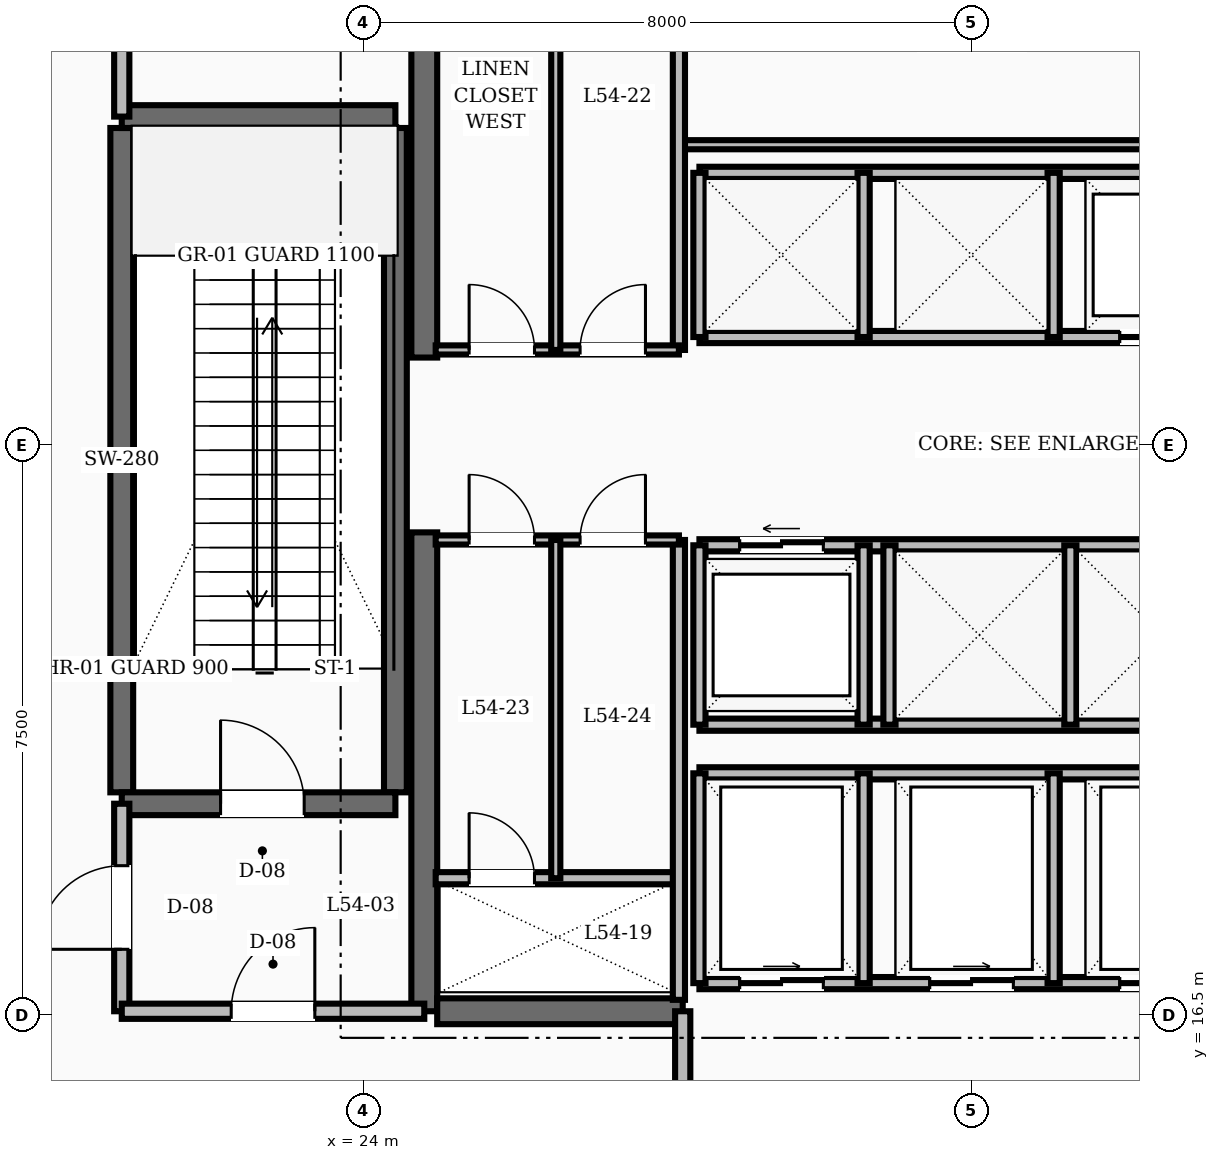
"""IFC4 building model, lengths in metres.
Left out: names, types, materials, properties, quantities, classifications, styles, units other than length and angle.
Written with IfcOpenShell. Run it as: python <this file> out.ifc"""

import sys

from ifc_helpers import new_model, si_unit, direction, frame, frame_2d, origin, place, context, subcontext, project, spatial, rectangle, extrude, element, fill, save


model = new_model("IFC4")
c1 = context("Model", 3, precision=1e-05, world=origin(), true_north=direction((0.0, 1.0)))
c2 = subcontext(c1, "Body", "Model", "MODEL_VIEW")
j1 = project(units=[si_unit("LENGTHUNIT", "METRE"), si_unit("PLANEANGLEUNIT", "RADIAN")], contexts=[c1])
p1 = place(None, origin())
s1 = spatial("IfcSite", under=j1, at=p1, CompositionType="ELEMENT")
p2 = place(p1, origin())
s2 = spatial("IfcBuilding", under=s1, at=p2, CompositionType="ELEMENT")
p3 = place(p2, frame((0.0, 0.0, 208.4)))
s3 = spatial("IfcBuildingStorey", under=s2, at=p3, CompositionType="ELEMENT", Elevation=208.4)
for number, where, z_axis, x_axis in (
    (1, (24.8, 16.55, 0.0), (0.0, 0.0, 1.0), (0.0, 1.0, 0.0)),
    (2, (24.8, 25.15, 0.0), (0.0, 0.0, 1.0), (0.0, 1.0, 0.0)),
):
    element("IfcWall", number, at=place(p3, frame(where, z_axis=z_axis, x_axis=x_axis)), inside=s3, PredefinedType="SHEAR", context=c2, shape_type="SweptSolid", body=[
        extrude(rectangle(XDim=6.3, YDim=0.34, at=frame_2d((3.15, 0.0))), origin(), (0.0, 0.0, 1.0), 6.4),
    ])
p4 = place(p3, frame((24.97, 16.55, 0.0), z_axis=(0.0, 0.0, 1.0), x_axis=(1.0, 0.0, 0.0)))
e3 = element("IfcWall", 3, at=p4, inside=s3, PredefinedType="SHEAR", context=c2, shape_type="SweptSolid", body=[
    extrude(rectangle(XDim=3.23, YDim=0.34, at=frame_2d((1.615, 0.0))), origin(), (0.0, 0.0, 1.0), 6.4),
])
for number, where, z_axis, x_axis in (
    (4, (20.82, 19.43, 0.0), (0.0, 0.0, 1.0), (0.0, 1.0, 0.0)),
    (5, (24.42, 19.43, 0.0), (0.0, 0.0, 1.0), (0.0, 1.0, 0.0)),
):
    element("IfcWall", number, at=place(p3, frame(where, z_axis=z_axis, x_axis=x_axis)), inside=s3, PredefinedType="SHEAR", context=c2, shape_type="SweptSolid", body=[
        extrude(rectangle(XDim=8.74, YDim=0.3, at=frame_2d((4.37, 0.0))), origin(), (0.0, 0.0, 1.0), 6.4),
    ])
p5 = place(p3, frame((20.82, 19.28, 0.0), z_axis=(0.0, 0.0, 1.0), x_axis=(1.0, 0.0, 0.0)))
e6 = element("IfcWall", 6, at=p5, inside=s3, PredefinedType="SHEAR", context=c2, shape_type="SweptSolid", body=[
    extrude(rectangle(XDim=3.6, YDim=0.3, at=frame_2d((1.8, 0.0))), origin(), (0.0, 0.0, 1.0), 6.4),
])
p6 = place(p5, frame((1.3, 0.0, 0.0)))
e7 = element("IfcOpeningElement", 7, at=p6, cuts=e6, PredefinedType="OPENING", context=c2, shape_type="SweptSolid", body=[
    extrude(rectangle(XDim=1.1, YDim=2.1, at=frame_2d((0.55, 1.05))), frame((0.0, 0.16, 0.0), z_axis=(0.0, -1.0, 0.0), x_axis=(1.0, 0.0, 0.0)), (0.0, 0.0, 1.0), 0.32),
])
p7 = place(p3, frame((20.82, 28.32, 0.0), z_axis=(0.0, 0.0, 1.0), x_axis=(1.0, 0.0, 0.0)))
e8 = element("IfcWall", 8, at=p7, inside=s3, PredefinedType="SHEAR", context=c2, shape_type="SweptSolid", body=[
    extrude(rectangle(XDim=3.6, YDim=0.3, at=frame_2d((1.8, 0.0))), origin(), (0.0, 0.0, 1.0), 6.4),
])
p8 = place(p3, frame((20.82, 16.55, 0.0), z_axis=(0.0, 0.0, 1.0), x_axis=(0.0, 1.0, 0.0)))
e9 = element("IfcWall", 9, at=p8, inside=s3, PredefinedType="SOLIDWALL", context=c2, shape_type="SweptSolid", body=[
    extrude(rectangle(XDim=2.73, YDim=0.2, at=frame_2d((1.365, 0.0))), origin(), (0.0, 0.0, 1.0), 5.13),
])
p9 = place(p8, frame((0.815, 0.0, 0.0)))
e10 = element("IfcOpeningElement", 10, at=p9, cuts=e9, PredefinedType="OPENING", context=c2, shape_type="SweptSolid", body=[
    extrude(rectangle(XDim=1.1, YDim=2.1, at=frame_2d((0.55, 1.05))), frame((0.0, 0.11, 0.0), z_axis=(0.0, -1.0, 0.0), x_axis=(1.0, 0.0, 0.0)), (0.0, 0.0, 1.0), 0.22),
])
p10 = place(p3, frame((20.82, 16.55, 0.0), z_axis=(0.0, 0.0, 1.0), x_axis=(1.0, 0.0, 0.0)))
e11 = element("IfcWall", 11, at=p10, inside=s3, PredefinedType="SOLIDWALL", context=c2, shape_type="SweptSolid", body=[
    extrude(rectangle(XDim=3.98, YDim=0.2, at=frame_2d((1.99, 0.0))), origin(), (0.0, 0.0, 1.0), 5.13),
])
p11 = place(p10, frame((1.44, 0.0, 0.0)))
e12 = element("IfcOpeningElement", 12, at=p11, cuts=e11, PredefinedType="OPENING", context=c2, shape_type="SweptSolid", body=[
    extrude(rectangle(XDim=1.1, YDim=2.1, at=frame_2d((0.55, 1.05))), frame((0.0, 0.11, 0.0), z_axis=(0.0, -1.0, 0.0), x_axis=(1.0, 0.0, 0.0)), (0.0, 0.0, 1.0), 0.22),
])
p12 = place(p3, frame((20.82, 28.32, 0.0), z_axis=(0.0, 0.0, 1.0), x_axis=(0.0, 1.0, 0.0)))
e13 = element("IfcWall", 13, at=p12, inside=s3, PredefinedType="SOLIDWALL", context=c2, shape_type="SweptSolid", body=[
    extrude(rectangle(XDim=3.13, YDim=0.2, at=frame_2d((1.565, 0.0))), origin(), (0.0, 0.0, 1.0), 5.13),
])
p13 = place(p12, frame((1.09, 0.0, 0.0)))
e14 = element("IfcOpeningElement", 14, at=p13, cuts=e13, PredefinedType="OPENING", context=c2, shape_type="SweptSolid", body=[
    extrude(rectangle(XDim=0.95, YDim=2.1, at=frame_2d((0.475, 1.05))), frame((0.0, 0.11, 0.0), z_axis=(0.0, -1.0, 0.0), x_axis=(1.0, 0.0, 0.0)), (0.0, 0.0, 1.0), 0.22),
])
p14 = place(p3, frame((28.2, 14.35, 0.0), z_axis=(0.0, 0.0, 1.0), x_axis=(0.0, 1.0, 0.0)))
e15 = element("IfcWall", 15, at=p14, inside=s3, PredefinedType="SOLIDWALL", context=c2, shape_type="SweptSolid", body=[
    extrude(rectangle(XDim=2.2, YDim=0.2, at=frame_2d((1.1, 0.0))), origin(), (0.0, 0.0, 1.0), 5.13),
])
p15 = place(p3, frame((28.42, 25.42, 0.0), z_axis=(0.0, 0.0, 1.0), x_axis=(1.0, 0.0, 0.0)))
e16 = element("IfcWall", 16, at=p15, inside=s3, PredefinedType="SOLIDWALL", context=c2, shape_type="SweptSolid", body=[
    extrude(rectangle(XDim=7.16, YDim=0.16, at=frame_2d((3.58, 0.0))), origin(), (0.0, 0.0, 1.0), 5.13),
])
p16 = place(p15, frame((5.53, 0.0, 0.0)))
e17 = element("IfcOpeningElement", 17, at=p16, cuts=e16, PredefinedType="OPENING", context=c2, shape_type="SweptSolid", body=[
    extrude(rectangle(XDim=1.1, YDim=2.15, at=frame_2d((0.55, 1.075))), frame((0.0, 0.09, 0.0), z_axis=(0.0, -1.0, 0.0), x_axis=(1.0, 0.0, 0.0)), (0.0, 0.0, 1.0), 0.18),
])
p17 = place(p3, frame((28.42, 27.58, 0.0), z_axis=(0.0, 0.0, 1.0), x_axis=(1.0, 0.0, 0.0)))
e18 = element("IfcWall", 18, at=p17, inside=s3, PredefinedType="SOLIDWALL", context=c2, shape_type="SweptSolid", body=[
    extrude(rectangle(XDim=7.16, YDim=0.16, at=frame_2d((3.58, 0.0))), origin(), (0.0, 0.0, 1.0), 5.13),
])
for number, where, z_axis, x_axis in (
    (19, (28.42, 25.42, 0.0), (0.0, 0.0, 1.0), (0.0, 1.0, 0.0)),
    (20, (30.58, 25.42, 0.0), (0.0, 0.0, 1.0), (0.0, 1.0, 0.0)),
    (21, (33.08, 25.42, 0.0), (0.0, 0.0, 1.0), (0.0, 1.0, 0.0)),
):
    element("IfcWall", number, at=place(p3, frame(where, z_axis=z_axis, x_axis=x_axis)), inside=s3, PredefinedType="SOLIDWALL", context=c2, shape_type="SweptSolid", body=[
        extrude(rectangle(XDim=2.16, YDim=0.16, at=frame_2d((1.08, 0.0))), origin(), (0.0, 0.0, 1.0), 5.13),
    ])
p18 = place(p3, frame((28.42, 22.68, 0.0), z_axis=(0.0, 0.0, 1.0), x_axis=(1.0, 0.0, 0.0)))
e22 = element("IfcWall", 22, at=p18, inside=s3, PredefinedType="SOLIDWALL", context=c2, shape_type="SweptSolid", body=[
    extrude(rectangle(XDim=7.26, YDim=0.16, at=frame_2d((3.63, 0.0))), origin(), (0.0, 0.0, 1.0), 5.13),
])
p19 = place(p18, frame((0.53, 0.0, 0.0)))
e23 = element("IfcOpeningElement", 23, at=p19, cuts=e22, PredefinedType="OPENING", context=c2, shape_type="SweptSolid", body=[
    extrude(rectangle(XDim=1.1, YDim=2.15, at=frame_2d((0.55, 1.075))), frame((0.0, 0.09, 0.0), z_axis=(0.0, -1.0, 0.0), x_axis=(1.0, 0.0, 0.0)), (0.0, 0.0, 1.0), 0.18),
])
p20 = place(p3, frame((28.42, 20.32, 0.0), z_axis=(0.0, 0.0, 1.0), x_axis=(1.0, 0.0, 0.0)))
e24 = element("IfcWall", 24, at=p20, inside=s3, PredefinedType="SOLIDWALL", context=c2, shape_type="SweptSolid", body=[
    extrude(rectangle(XDim=7.26, YDim=0.16, at=frame_2d((3.63, 0.0))), origin(), (0.0, 0.0, 1.0), 5.13),
])
for number, where, z_axis, x_axis in (
    (25, (28.42, 20.32, 0.0), (0.0, 0.0, 1.0), (0.0, 1.0, 0.0)),
    (26, (30.58, 20.32, 0.0), (0.0, 0.0, 1.0), (0.0, 1.0, 0.0)),
    (27, (30.92, 20.32, 0.0), (0.0, 0.0, 1.0), (0.0, 1.0, 0.0)),
    (28, (33.3, 20.32, 0.0), (0.0, 0.0, 1.0), (0.0, 1.0, 0.0)),
):
    element("IfcWall", number, at=place(p3, frame(where, z_axis=z_axis, x_axis=x_axis)), inside=s3, PredefinedType="SOLIDWALL", context=c2, shape_type="SweptSolid", body=[
        extrude(rectangle(XDim=2.36, YDim=0.16, at=frame_2d((1.18, 0.0))), origin(), (0.0, 0.0, 1.0), 5.13),
    ])
p21 = place(p3, frame((28.42, 16.92, 0.0), z_axis=(0.0, 0.0, 1.0), x_axis=(1.0, 0.0, 0.0)))
e29 = element("IfcWall", 29, at=p21, inside=s3, PredefinedType="SOLIDWALL", context=c2, shape_type="SweptSolid", body=[
    extrude(rectangle(XDim=7.16, YDim=0.16, at=frame_2d((3.58, 0.0))), origin(), (0.0, 0.0, 1.0), 5.13),
])
p22 = place(p21, frame((0.53, 0.0, 0.0)))
e30 = element("IfcOpeningElement", 30, at=p22, cuts=e29, PredefinedType="OPENING", context=c2, shape_type="SweptSolid", body=[
    extrude(rectangle(XDim=1.1, YDim=2.15, at=frame_2d((0.55, 1.075))), frame((0.0, 0.09, 0.0), z_axis=(0.0, -1.0, 0.0), x_axis=(1.0, 0.0, 0.0)), (0.0, 0.0, 1.0), 0.18),
])
p23 = place(p21, frame((3.03, 0.0, 0.0)))
e31 = element("IfcOpeningElement", 31, at=p23, cuts=e29, PredefinedType="OPENING", context=c2, shape_type="SweptSolid", body=[
    extrude(rectangle(XDim=1.1, YDim=2.15, at=frame_2d((0.55, 1.075))), frame((0.0, 0.09, 0.0), z_axis=(0.0, -1.0, 0.0), x_axis=(1.0, 0.0, 0.0)), (0.0, 0.0, 1.0), 0.18),
])
p24 = place(p21, frame((5.53, 0.0, 0.0)))
e32 = element("IfcOpeningElement", 32, at=p24, cuts=e29, PredefinedType="OPENING", context=c2, shape_type="SweptSolid", body=[
    extrude(rectangle(XDim=1.1, YDim=2.15, at=frame_2d((0.55, 1.075))), frame((0.0, 0.09, 0.0), z_axis=(0.0, -1.0, 0.0), x_axis=(1.0, 0.0, 0.0)), (0.0, 0.0, 1.0), 0.18),
])
p25 = place(p3, frame((28.42, 19.68, 0.0), z_axis=(0.0, 0.0, 1.0), x_axis=(1.0, 0.0, 0.0)))
e33 = element("IfcWall", 33, at=p25, inside=s3, PredefinedType="SOLIDWALL", context=c2, shape_type="SweptSolid", body=[
    extrude(rectangle(XDim=7.16, YDim=0.16, at=frame_2d((3.58, 0.0))), origin(), (0.0, 0.0, 1.0), 5.13),
])
for number, where, z_axis, x_axis in (
    (34, (28.42, 16.92, 0.0), (0.0, 0.0, 1.0), (0.0, 1.0, 0.0)),
    (35, (30.58, 16.92, 0.0), (0.0, 0.0, 1.0), (0.0, 1.0, 0.0)),
    (36, (33.08, 16.92, 0.0), (0.0, 0.0, 1.0), (0.0, 1.0, 0.0)),
):
    element("IfcWall", number, at=place(p3, frame(where, z_axis=z_axis, x_axis=x_axis)), inside=s3, PredefinedType="SOLIDWALL", context=c2, shape_type="SweptSolid", body=[
        extrude(rectangle(XDim=2.76, YDim=0.16, at=frame_2d((1.38, 0.0))), origin(), (0.0, 0.0, 1.0), 5.13),
    ])
p26 = place(p3, frame((28.2, 27.95, 0.0), z_axis=(0.0, 0.0, 1.0), x_axis=(1.0, 0.0, 0.0)))
e37 = element("IfcWall", 37, at=p26, inside=s3, PredefinedType="PARTITIONING", context=c2, shape_type="SweptSolid", body=[
    extrude(rectangle(XDim=7.6, YDim=0.12, at=frame_2d((3.8, 0.0))), origin(), (0.0, 0.0, 1.0), 5.13),
])
p27 = place(p3, frame((24.95, 18.3, 0.0), z_axis=(0.0, 0.0, 1.0), x_axis=(1.0, 0.0, 0.0)))
e38 = element("IfcWall", 38, at=p27, inside=s3, PredefinedType="SOLIDWALL", context=c2, shape_type="SweptSolid", body=[
    extrude(rectangle(XDim=3.2, YDim=0.16, at=frame_2d((1.6, 0.0))), origin(), (0.0, 0.0, 1.0), 5.13),
])
p28 = place(p27, frame((0.44, 0.0, 0.0)))
e39 = element("IfcOpeningElement", 39, at=p28, cuts=e38, PredefinedType="OPENING", context=c2, shape_type="SweptSolid", body=[
    extrude(rectangle(XDim=0.86, YDim=2.05, at=frame_2d((0.43, 1.025))), frame((0.0, 0.09, 0.0), z_axis=(0.0, -1.0, 0.0), x_axis=(1.0, 0.0, 0.0)), (0.0, 0.0, 1.0), 0.18),
])
p29 = place(p3, frame((28.15, 16.7, 0.0), z_axis=(0.0, 0.0, 1.0), x_axis=(0.0, 1.0, 0.0)))
e40 = element("IfcWall", 40, at=p29, inside=s3, PredefinedType="SOLIDWALL", context=c2, shape_type="SweptSolid", body=[
    extrude(rectangle(XDim=6.05, YDim=0.16, at=frame_2d((3.025, 0.0))), origin(), (0.0, 0.0, 1.0), 5.13),
])
p30 = place(p3, frame((28.15, 25.25, 0.0), z_axis=(0.0, 0.0, 1.0), x_axis=(0.0, 1.0, 0.0)))
e41 = element("IfcWall", 41, at=p30, inside=s3, PredefinedType="SOLIDWALL", context=c2, shape_type="SweptSolid", body=[
    extrude(rectangle(XDim=6.1, YDim=0.16, at=frame_2d((3.05, 0.0))), origin(), (0.0, 0.0, 1.0), 5.13),
])
p31 = place(p3, frame((24.95, 25.25, 0.0), z_axis=(0.0, 0.0, 1.0), x_axis=(1.0, 0.0, 0.0)))
e42 = element("IfcWall", 42, at=p31, inside=s3, PredefinedType="PARTITIONING", context=c2, shape_type="SweptSolid", body=[
    extrude(rectangle(XDim=3.2, YDim=0.12, at=frame_2d((1.6, 0.0))), origin(), (0.0, 0.0, 1.0), 5.13),
])
p32 = place(p31, frame((0.44, 0.0, 0.0)))
e43 = element("IfcOpeningElement", 43, at=p32, cuts=e42, PredefinedType="OPENING", context=c2, shape_type="SweptSolid", body=[
    extrude(rectangle(XDim=0.86, YDim=2.1, at=frame_2d((0.43, 1.05))), frame((0.0, 0.07, 0.0), z_axis=(0.0, -1.0, 0.0), x_axis=(1.0, 0.0, 0.0)), (0.0, 0.0, 1.0), 0.14),
])
p33 = place(p31, frame((1.9, 0.0, 0.0)))
e44 = element("IfcOpeningElement", 44, at=p33, cuts=e42, PredefinedType="OPENING", context=c2, shape_type="SweptSolid", body=[
    extrude(rectangle(XDim=0.86, YDim=2.1, at=frame_2d((0.43, 1.05))), frame((0.0, 0.07, 0.0), z_axis=(0.0, -1.0, 0.0), x_axis=(1.0, 0.0, 0.0)), (0.0, 0.0, 1.0), 0.14),
])
p34 = place(p3, frame((24.95, 22.75, 0.0), z_axis=(0.0, 0.0, 1.0), x_axis=(1.0, 0.0, 0.0)))
e45 = element("IfcWall", 45, at=p34, inside=s3, PredefinedType="PARTITIONING", context=c2, shape_type="SweptSolid", body=[
    extrude(rectangle(XDim=3.2, YDim=0.12, at=frame_2d((1.6, 0.0))), origin(), (0.0, 0.0, 1.0), 5.13),
])
p35 = place(p34, frame((0.44, 0.0, 0.0)))
e46 = element("IfcOpeningElement", 46, at=p35, cuts=e45, PredefinedType="OPENING", context=c2, shape_type="SweptSolid", body=[
    extrude(rectangle(XDim=0.86, YDim=2.1, at=frame_2d((0.43, 1.05))), frame((0.0, 0.07, 0.0), z_axis=(0.0, -1.0, 0.0), x_axis=(1.0, 0.0, 0.0)), (0.0, 0.0, 1.0), 0.14),
])
p36 = place(p34, frame((1.9, 0.0, 0.0)))
e47 = element("IfcOpeningElement", 47, at=p36, cuts=e45, PredefinedType="OPENING", context=c2, shape_type="SweptSolid", body=[
    extrude(rectangle(XDim=0.86, YDim=2.1, at=frame_2d((0.43, 1.05))), frame((0.0, 0.07, 0.0), z_axis=(0.0, -1.0, 0.0), x_axis=(1.0, 0.0, 0.0)), (0.0, 0.0, 1.0), 0.14),
])
p37 = place(p3, frame((26.53, 25.25, 0.0), z_axis=(0.0, 0.0, 1.0), x_axis=(0.0, 1.0, 0.0)))
e48 = element("IfcWall", 48, at=p37, inside=s3, PredefinedType="PARTITIONING", context=c2, shape_type="SweptSolid", body=[
    extrude(rectangle(XDim=6.1, YDim=0.12, at=frame_2d((3.05, 0.0))), origin(), (0.0, 0.0, 1.0), 5.13),
])
p38 = place(p3, frame((26.53, 18.3, 0.0), z_axis=(0.0, 0.0, 1.0), x_axis=(0.0, 1.0, 0.0)))
e49 = element("IfcWall", 49, at=p38, inside=s3, PredefinedType="PARTITIONING", context=c2, shape_type="SweptSolid", body=[
    extrude(rectangle(XDim=4.45, YDim=0.12, at=frame_2d((2.225, 0.0))), origin(), (0.0, 0.0, 1.0), 5.13),
])
p39 = place(p6, origin())
e50 = element("IfcDoor", 50, at=p39, inside=s3, OperationType="SINGLE_SWING_LEFT", PredefinedType="DOOR", context=c2, shape_type="SweptSolid", body=[
    extrude(rectangle(XDim=1.1, YDim=2.1, at=frame_2d((0.55, 1.05))), frame((0.0, 0.025, 0.0), z_axis=(0.0, -1.0, 0.0), x_axis=(1.0, 0.0, 0.0)), (0.0, 0.0, 1.0), 0.05),
])
fill(e7, e50)
p40 = place(p9, origin())
e51 = element("IfcDoor", 51, at=p40, inside=s3, OperationType="SINGLE_SWING_LEFT", PredefinedType="DOOR", context=c2, shape_type="SweptSolid", body=[
    extrude(rectangle(XDim=1.1, YDim=2.1, at=frame_2d((0.55, 1.05))), frame((0.0, 0.025, 0.0), z_axis=(0.0, -1.0, 0.0), x_axis=(1.0, 0.0, 0.0)), (0.0, 0.0, 1.0), 0.05),
])
fill(e10, e51)
p41 = place(p11, origin())
e52 = element("IfcDoor", 52, at=p41, inside=s3, OperationType="SINGLE_SWING_RIGHT", PredefinedType="DOOR", context=c2, shape_type="SweptSolid", body=[
    extrude(rectangle(XDim=1.1, YDim=2.1, at=frame_2d((0.55, 1.05))), frame((0.0, 0.025, 0.0), z_axis=(0.0, -1.0, 0.0), x_axis=(1.0, 0.0, 0.0)), (0.0, 0.0, 1.0), 0.05),
])
fill(e12, e52)
p42 = place(p16, origin())
e53 = element("IfcDoor", 53, at=p42, inside=s3, OperationType="SLIDING_TO_RIGHT", PredefinedType="DOOR", context=c2, shape_type="SweptSolid", body=[
    extrude(rectangle(XDim=1.1, YDim=2.15, at=frame_2d((0.55, 1.075))), frame((0.0, 0.025, 0.0), z_axis=(0.0, -1.0, 0.0), x_axis=(1.0, 0.0, 0.0)), (0.0, 0.0, 1.0), 0.05),
])
fill(e17, e53)
p43 = place(p19, origin())
e54 = element("IfcDoor", 54, at=p43, inside=s3, OperationType="SLIDING_TO_LEFT", PredefinedType="DOOR", context=c2, shape_type="SweptSolid", body=[
    extrude(rectangle(XDim=1.1, YDim=2.15, at=frame_2d((0.55, 1.075))), frame((0.0, 0.025, 0.0), z_axis=(0.0, -1.0, 0.0), x_axis=(1.0, 0.0, 0.0)), (0.0, 0.0, 1.0), 0.05),
])
fill(e23, e54)
p44 = place(p22, origin())
e55 = element("IfcDoor", 55, at=p44, inside=s3, OperationType="SLIDING_TO_RIGHT", PredefinedType="DOOR", context=c2, shape_type="SweptSolid", body=[
    extrude(rectangle(XDim=1.1, YDim=2.15, at=frame_2d((0.55, 1.075))), frame((0.0, 0.025, 0.0), z_axis=(0.0, -1.0, 0.0), x_axis=(1.0, 0.0, 0.0)), (0.0, 0.0, 1.0), 0.05),
])
fill(e30, e55)
p45 = place(p23, origin())
e56 = element("IfcDoor", 56, at=p45, inside=s3, OperationType="SLIDING_TO_RIGHT", PredefinedType="DOOR", context=c2, shape_type="SweptSolid", body=[
    extrude(rectangle(XDim=1.1, YDim=2.15, at=frame_2d((0.55, 1.075))), frame((0.0, 0.025, 0.0), z_axis=(0.0, -1.0, 0.0), x_axis=(1.0, 0.0, 0.0)), (0.0, 0.0, 1.0), 0.05),
])
fill(e31, e56)
p46 = place(p24, origin())
e57 = element("IfcDoor", 57, at=p46, inside=s3, OperationType="SLIDING_TO_RIGHT", PredefinedType="DOOR", context=c2, shape_type="SweptSolid", body=[
    extrude(rectangle(XDim=1.1, YDim=2.15, at=frame_2d((0.55, 1.075))), frame((0.0, 0.025, 0.0), z_axis=(0.0, -1.0, 0.0), x_axis=(1.0, 0.0, 0.0)), (0.0, 0.0, 1.0), 0.05),
])
fill(e32, e57)
p47 = place(p28, origin())
e58 = element("IfcDoor", 58, at=p47, inside=s3, OperationType="SINGLE_SWING_LEFT", PredefinedType="TRAPDOOR", context=c2, shape_type="SweptSolid", body=[
    extrude(rectangle(XDim=0.86, YDim=2.05, at=frame_2d((0.43, 1.025))), frame((0.0, 0.025, 0.0), z_axis=(0.0, -1.0, 0.0), x_axis=(1.0, 0.0, 0.0)), (0.0, 0.0, 1.0), 0.05),
])
fill(e39, e58)
p48 = place(p32, origin())
e59 = element("IfcDoor", 59, at=p48, inside=s3, OperationType="SINGLE_SWING_LEFT", PredefinedType="DOOR", context=c2, shape_type="SweptSolid", body=[
    extrude(rectangle(XDim=0.86, YDim=2.1, at=frame_2d((0.43, 1.05))), frame((0.0, 0.025, 0.0), z_axis=(0.0, -1.0, 0.0), x_axis=(1.0, 0.0, 0.0)), (0.0, 0.0, 1.0), 0.05),
])
fill(e43, e59)
p49 = place(p33, origin())
e60 = element("IfcDoor", 60, at=p49, inside=s3, OperationType="SINGLE_SWING_RIGHT", PredefinedType="DOOR", context=c2, shape_type="SweptSolid", body=[
    extrude(rectangle(XDim=0.86, YDim=2.1, at=frame_2d((0.43, 1.05))), frame((0.0, 0.025, 0.0), z_axis=(0.0, -1.0, 0.0), x_axis=(1.0, 0.0, 0.0)), (0.0, 0.0, 1.0), 0.05),
])
fill(e44, e60)
p50 = place(p35, origin())
e61 = element("IfcDoor", 61, at=p50, inside=s3, OperationType="SINGLE_SWING_LEFT", PredefinedType="DOOR", context=c2, shape_type="SweptSolid", body=[
    extrude(rectangle(XDim=0.86, YDim=2.1, at=frame_2d((0.43, 1.05))), frame((0.0, 0.025, 0.0), z_axis=(0.0, -1.0, 0.0), x_axis=(1.0, 0.0, 0.0)), (0.0, 0.0, 1.0), 0.05),
])
fill(e46, e61)
p51 = place(p36, origin())
e62 = element("IfcDoor", 62, at=p51, inside=s3, OperationType="SINGLE_SWING_RIGHT", PredefinedType="DOOR", context=c2, shape_type="SweptSolid", body=[
    extrude(rectangle(XDim=0.86, YDim=2.1, at=frame_2d((0.43, 1.05))), frame((0.0, 0.025, 0.0), z_axis=(0.0, -1.0, 0.0), x_axis=(1.0, 0.0, 0.0)), (0.0, 0.0, 1.0), 0.05),
])
fill(e47, e62)
save(model, sys.argv[1])
